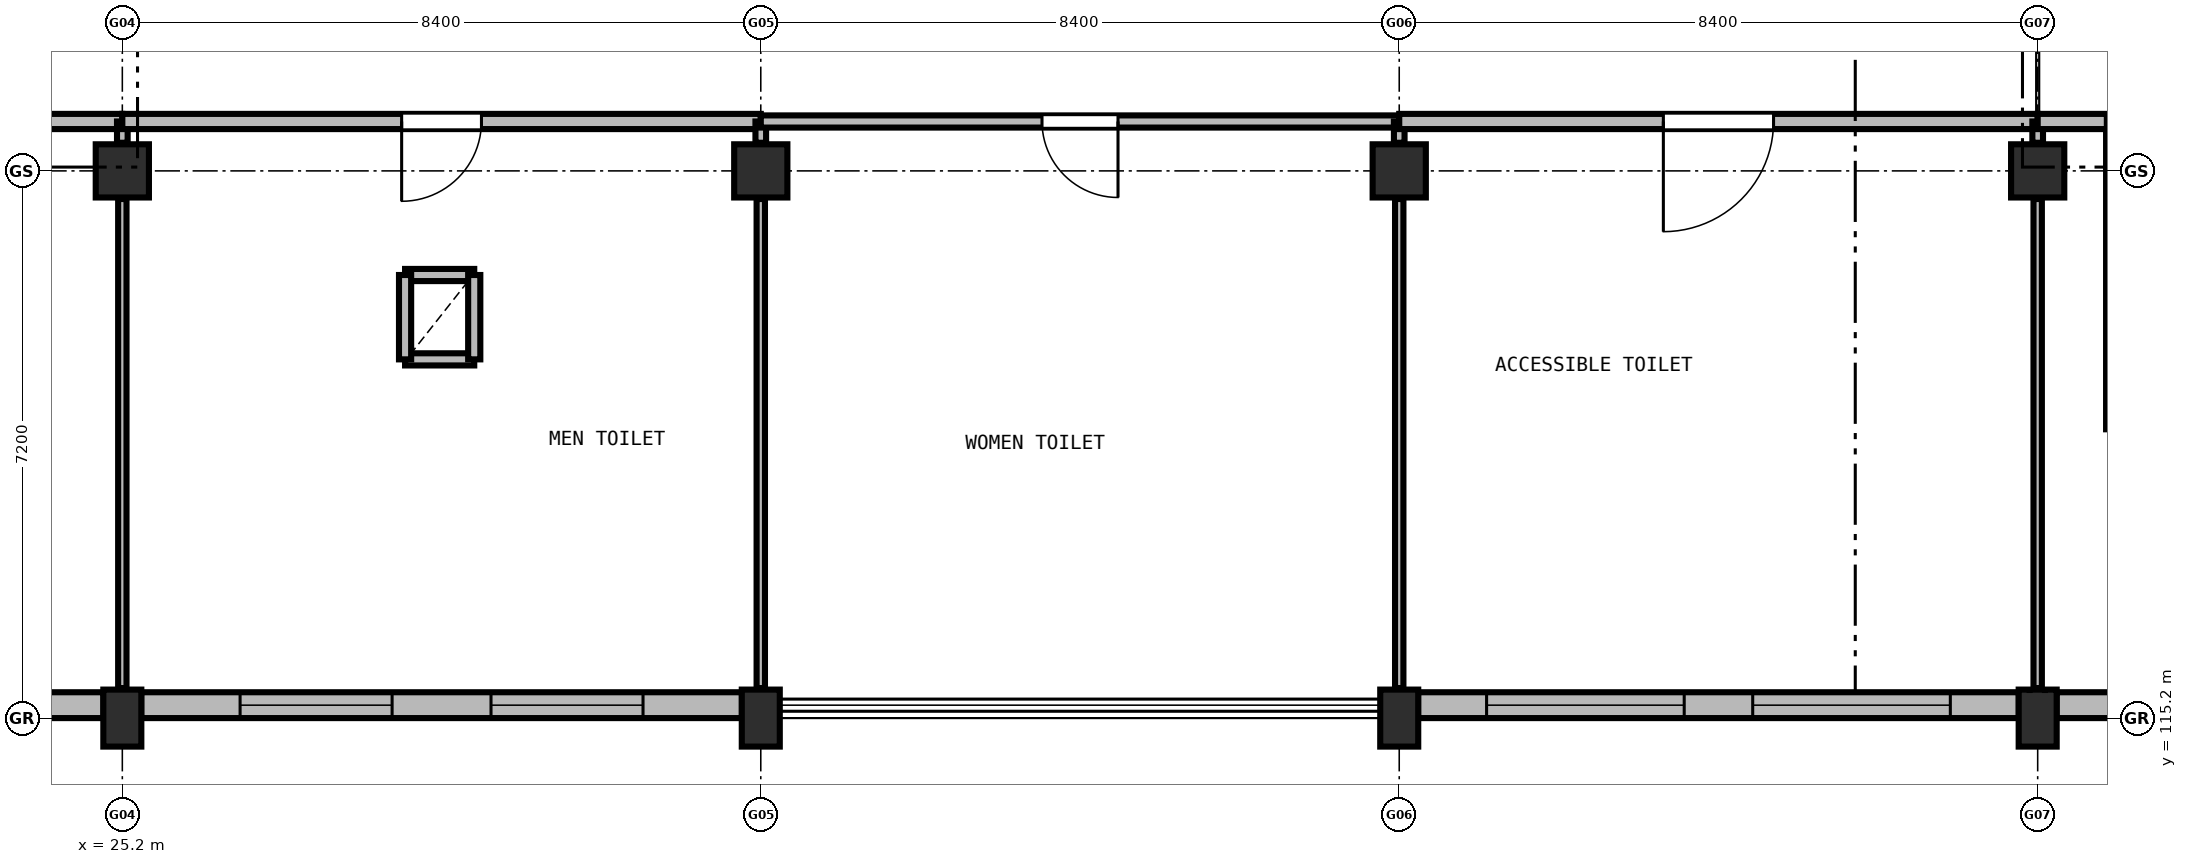
"""IFC4 building model, lengths in metres.
Left out: names, types, materials, properties, quantities, classifications, styles, units other than length and angle.
Written with IfcOpenShell. Run it as: python <this file> out.ifc"""

import sys

from ifc_helpers import new_model, si_unit, direction, frame, frame_2d, origin, origin_2d, place, context, subcontext, project, spatial, rectangle, extrude, element, fill, save


model = new_model("IFC4")
c1 = context("Model", 3, precision=1e-05, world=origin(), true_north=direction((0.0, 1.0)))
c2 = subcontext(c1, "Body", "Model", "MODEL_VIEW")
j1 = project(units=[si_unit("LENGTHUNIT", "METRE"), si_unit("PLANEANGLEUNIT", "RADIAN")], contexts=[c1])
p1 = place(None, origin())
s1 = spatial("IfcSite", under=j1, at=p1, CompositionType="ELEMENT")
p2 = place(p1, origin())
s2 = spatial("IfcBuilding", under=s1, at=p2, CompositionType="ELEMENT")
p3 = place(p2, frame((0.0, 0.0, 9.3)))
s3 = spatial("IfcBuildingStorey", under=s2, at=p3, CompositionType="ELEMENT", Elevation=9.3)
p4 = place(p3, frame((25.2, 115.2, 0.0), z_axis=(0.0, 0.0, 1.0), x_axis=(1.0, 0.0, 0.0)))
e1 = element("IfcColumn", 1, at=p4, inside=s3, PredefinedType="COLUMN", context=c2, shape_type="SweptSolid", body=[
    extrude(rectangle(XDim=0.5, YDim=0.75, at=origin_2d()), origin(), (0.0, 0.0, 1.0), 4.2),
])
p5 = place(p3, frame((25.2, 122.4, 0.0), z_axis=(0.0, 0.0, 1.0), x_axis=(1.0, 0.0, 0.0)))
e2 = element("IfcColumn", 2, at=p5, inside=s3, PredefinedType="COLUMN", context=c2, shape_type="SweptSolid", body=[
    extrude(rectangle(XDim=0.7, YDim=0.7, at=origin_2d()), origin(), (0.0, 0.0, 1.0), 4.2),
])
p6 = place(p3, frame((33.6, 115.2, 0.0), z_axis=(0.0, 0.0, 1.0), x_axis=(1.0, 0.0, 0.0)))
e3 = element("IfcColumn", 3, at=p6, inside=s3, PredefinedType="COLUMN", context=c2, shape_type="SweptSolid", body=[
    extrude(rectangle(XDim=0.5, YDim=0.75, at=origin_2d()), origin(), (0.0, 0.0, 1.0), 4.2),
])
p7 = place(p3, frame((33.6, 122.4, 0.0), z_axis=(0.0, 0.0, 1.0), x_axis=(1.0, 0.0, 0.0)))
e4 = element("IfcColumn", 4, at=p7, inside=s3, PredefinedType="COLUMN", context=c2, shape_type="SweptSolid", body=[
    extrude(rectangle(XDim=0.7, YDim=0.7, at=origin_2d()), origin(), (0.0, 0.0, 1.0), 4.2),
])
p8 = place(p3, frame((42.0, 115.2, 0.0), z_axis=(0.0, 0.0, 1.0), x_axis=(1.0, 0.0, 0.0)))
e5 = element("IfcColumn", 5, at=p8, inside=s3, PredefinedType="COLUMN", context=c2, shape_type="SweptSolid", body=[
    extrude(rectangle(XDim=0.5, YDim=0.75, at=origin_2d()), origin(), (0.0, 0.0, 1.0), 4.2),
])
p9 = place(p3, frame((42.0, 122.4, 0.0), z_axis=(0.0, 0.0, 1.0), x_axis=(1.0, 0.0, 0.0)))
e6 = element("IfcColumn", 6, at=p9, inside=s3, PredefinedType="COLUMN", context=c2, shape_type="SweptSolid", body=[
    extrude(rectangle(XDim=0.7, YDim=0.7, at=origin_2d()), origin(), (0.0, 0.0, 1.0), 4.2),
])
p10 = place(p3, frame((50.4, 115.2, 0.0), z_axis=(0.0, 0.0, 1.0), x_axis=(1.0, 0.0, 0.0)))
e7 = element("IfcColumn", 7, at=p10, inside=s3, PredefinedType="COLUMN", context=c2, shape_type="SweptSolid", body=[
    extrude(rectangle(XDim=0.5, YDim=0.75, at=origin_2d()), origin(), (0.0, 0.0, 1.0), 4.2),
])
p11 = place(p3, frame((50.4, 122.4, 0.0), z_axis=(0.0, 0.0, 1.0), x_axis=(1.0, 0.0, 0.0)))
e8 = element("IfcColumn", 8, at=p11, inside=s3, PredefinedType="COLUMN", context=c2, shape_type="SweptSolid", body=[
    extrude(rectangle(XDim=0.7, YDim=0.7, at=origin_2d()), origin(), (0.0, 0.0, 1.0), 4.2),
])
p12 = place(p3, frame((58.552, 115.37, 0.0), z_axis=(0.0, 0.0, 1.0), x_axis=(-1.0, 0.0, 0.0)))
e9 = element("IfcWall", 9, at=p12, inside=s3, PredefinedType="SOLIDWALL", context=c2, shape_type="SweptSolid", body=[
    extrude(rectangle(XDim=7.904, YDim=0.34, at=frame_2d((3.952, 0.0))), origin(), (0.0, 0.0, 1.0), 3.18),
])
p13 = place(p12, frame((2.552, 0.0, 0.95)))
e10 = element("IfcOpeningElement", 10, at=p13, cuts=e9, PredefinedType="OPENING", context=c2, shape_type="SweptSolid", body=[
    extrude(rectangle(XDim=2.8, YDim=1.98, at=frame_2d((1.4, 0.99))), frame((0.0, 0.18, 0.0), z_axis=(0.0, -1.0, 0.0), x_axis=(1.0, 0.0, 0.0)), (0.0, 0.0, 1.0), 0.36),
])
p14 = place(p3, frame((50.152, 115.37, 0.0), z_axis=(0.0, 0.0, 1.0), x_axis=(-1.0, 0.0, 0.0)))
e11 = element("IfcWall", 11, at=p14, inside=s3, PredefinedType="SOLIDWALL", context=c2, shape_type="SweptSolid", body=[
    extrude(rectangle(XDim=7.904, YDim=0.34, at=frame_2d((3.952, 0.0))), origin(), (0.0, 0.0, 1.0), 3.18),
])
p15 = place(p14, frame((0.901, 0.0, 0.95)))
e12 = element("IfcOpeningElement", 12, at=p15, cuts=e11, PredefinedType="OPENING", context=c2, shape_type="SweptSolid", body=[
    extrude(rectangle(XDim=2.6, YDim=1.8, at=frame_2d((1.3, 0.9))), frame((0.0, 0.18, 0.0), z_axis=(0.0, -1.0, 0.0), x_axis=(1.0, 0.0, 0.0)), (0.0, 0.0, 1.0), 0.36),
])
p16 = place(p14, frame((4.403, 0.0, 0.95)))
e13 = element("IfcOpeningElement", 13, at=p16, cuts=e11, PredefinedType="OPENING", context=c2, shape_type="SweptSolid", body=[
    extrude(rectangle(XDim=2.6, YDim=1.8, at=frame_2d((1.3, 0.9))), frame((0.0, 0.18, 0.0), z_axis=(0.0, -1.0, 0.0), x_axis=(1.0, 0.0, 0.0)), (0.0, 0.0, 1.0), 0.36),
])
p17 = place(p3, frame((33.352, 115.37, 0.0), z_axis=(0.0, 0.0, 1.0), x_axis=(-1.0, 0.0, 0.0)))
e14 = element("IfcWall", 14, at=p17, inside=s3, PredefinedType="SOLIDWALL", context=c2, shape_type="SweptSolid", body=[
    extrude(rectangle(XDim=7.904, YDim=0.34, at=frame_2d((3.952, 0.0))), origin(), (0.0, 0.0, 1.0), 3.18),
])
p18 = place(p17, frame((1.301, 0.0, 0.95)))
e15 = element("IfcOpeningElement", 15, at=p18, cuts=e14, PredefinedType="OPENING", context=c2, shape_type="SweptSolid", body=[
    extrude(rectangle(XDim=2.0, YDim=1.5, at=frame_2d((1.0, 0.75))), frame((0.0, 0.18, 0.0), z_axis=(0.0, -1.0, 0.0), x_axis=(1.0, 0.0, 0.0)), (0.0, 0.0, 1.0), 0.36),
])
p19 = place(p17, frame((4.603, 0.0, 0.95)))
e16 = element("IfcOpeningElement", 16, at=p19, cuts=e14, PredefinedType="OPENING", context=c2, shape_type="SweptSolid", body=[
    extrude(rectangle(XDim=2.0, YDim=1.5, at=frame_2d((1.0, 0.75))), frame((0.0, 0.18, 0.0), z_axis=(0.0, -1.0, 0.0), x_axis=(1.0, 0.0, 0.0)), (0.0, 0.0, 1.0), 0.36),
])
p20 = place(p3, frame((24.952, 115.37, 0.0), z_axis=(0.0, 0.0, 1.0), x_axis=(-1.0, 0.0, 0.0)))
e17 = element("IfcWall", 17, at=p20, inside=s3, PredefinedType="SOLIDWALL", context=c2, shape_type="SweptSolid", body=[
    extrude(rectangle(XDim=7.904, YDim=0.34, at=frame_2d((3.952, 0.0))), origin(), (0.0, 0.0, 1.0), 3.18),
])
p21 = place(p20, frame((1.635, 0.0, 0.95)))
e18 = element("IfcOpeningElement", 18, at=p21, cuts=e17, PredefinedType="OPENING", context=c2, shape_type="SweptSolid", body=[
    extrude(rectangle(XDim=1.5, YDim=1.4, at=frame_2d((0.75, 0.7))), frame((0.0, 0.18, 0.0), z_axis=(0.0, -1.0, 0.0), x_axis=(1.0, 0.0, 0.0)), (0.0, 0.0, 1.0), 0.36),
])
p22 = place(p20, frame((4.769, 0.0, 0.95)))
e19 = element("IfcOpeningElement", 19, at=p22, cuts=e17, PredefinedType="OPENING", context=c2, shape_type="SweptSolid", body=[
    extrude(rectangle(XDim=1.5, YDim=1.4, at=frame_2d((0.75, 0.7))), frame((0.0, 0.18, 0.0), z_axis=(0.0, -1.0, 0.0), x_axis=(1.0, 0.0, 0.0)), (0.0, 0.0, 1.0), 0.36),
])
p23 = place(p3, frame((51.45, 119.0, 0.0), z_axis=(0.0, 0.0, 1.0), x_axis=(0.0, 1.0, 0.0)))
e20 = element("IfcWall", 20, at=p23, inside=s3, PredefinedType="SHEAR", context=c2, shape_type="SweptSolid", body=[
    extrude(rectangle(XDim=4.1, YDim=0.3, at=frame_2d((2.05, 0.0))), origin(), (0.0, 0.0, 1.0), 3.94),
])
for number, where, z_axis, x_axis in (
    (21, (28.92, 119.92, 0.0), (0.0, 0.0, 1.0), (1.0, 0.0, 0.0)),
    (22, (29.83, 121.03, 0.0), (0.0, 0.0, 1.0), (-1.0, 0.0, 0.0)),
):
    element("IfcWall", number, at=place(p3, frame(where, z_axis=z_axis, x_axis=x_axis)), inside=s3, PredefinedType="PARTITIONING", context=c2, shape_type="SweptSolid", body=[
        extrude(rectangle(XDim=0.91, YDim=0.16, at=frame_2d((0.455, 0.0))), origin(), (0.0, 0.0, 1.0), 3.65),
    ])
for number, where, z_axis, x_axis in (
    (23, (28.92, 121.03, 0.0), (0.0, 0.0, 1.0), (0.0, -1.0, 0.0)),
    (24, (29.83, 119.92, 0.0), (0.0, 0.0, 1.0), (0.0, 1.0, 0.0)),
):
    element("IfcWall", number, at=place(p3, frame(where, z_axis=z_axis, x_axis=x_axis)), inside=s3, PredefinedType="PARTITIONING", context=c2, shape_type="SweptSolid", body=[
        extrude(rectangle(XDim=1.11, YDim=0.16, at=frame_2d((0.555, 0.0))), origin(), (0.0, 0.0, 1.0), 3.65),
    ])
p24 = place(p3, frame((25.2, 123.05, 0.0), z_axis=(0.0, 0.0, 1.0), x_axis=(-1.0, 0.0, 0.0)))
e25 = element("IfcWall", 25, at=p24, inside=s3, PredefinedType="SOLIDWALL", context=c2, shape_type="SweptSolid", body=[
    extrude(rectangle(XDim=6.11, YDim=0.2, at=frame_2d((3.055, 0.0))), origin(), (0.0, 0.0, 1.0), 3.325),
])
p25 = place(p3, frame((25.2, 115.595, 0.0), z_axis=(0.0, 0.0, 1.0), x_axis=(0.0, 1.0, 0.0)))
e26 = element("IfcWall", 26, at=p25, inside=s3, PredefinedType="PARTITIONING", context=c2, shape_type="SweptSolid", body=[
    extrude(rectangle(XDim=6.435, YDim=0.11, at=frame_2d((3.218, 0.0))), origin(), (0.0, 0.0, 1.0), 3.175),
])
p26 = place(p3, frame((25.2, 122.77, 0.0), z_axis=(0.0, 0.0, 1.0), x_axis=(0.0, 1.0, 0.0)))
e27 = element("IfcWall", 27, at=p26, inside=s3, PredefinedType="PARTITIONING", context=c2, shape_type="SweptSolid", body=[
    extrude(rectangle(XDim=0.28, YDim=0.14, at=frame_2d((0.14, 0.0))), origin(), (0.0, 0.0, 1.0), 3.175),
])
p27 = place(p3, frame((33.6, 123.05, 0.0), z_axis=(0.0, 0.0, 1.0), x_axis=(-1.0, 0.0, 0.0)))
e28 = element("IfcWall", 28, at=p27, inside=s3, PredefinedType="SOLIDWALL", context=c2, shape_type="SweptSolid", body=[
    extrude(rectangle(XDim=8.4, YDim=0.2, at=frame_2d((4.2, 0.0))), origin(), (0.0, 0.0, 1.0), 3.325),
])
p28 = place(p27, frame((3.675, 0.0, 0.0)))
e29 = element("IfcOpeningElement", 29, at=p28, cuts=e28, PredefinedType="OPENING", context=c2, shape_type="SweptSolid", body=[
    extrude(rectangle(XDim=1.05, YDim=2.15, at=frame_2d((0.525, 1.075))), frame((0.0, 0.11, 0.0), z_axis=(0.0, -1.0, 0.0), x_axis=(1.0, 0.0, 0.0)), (0.0, 0.0, 1.0), 0.22),
])
p29 = place(p3, frame((33.6, 115.595, 0.0), z_axis=(0.0, 0.0, 1.0), x_axis=(0.0, 1.0, 0.0)))
e30 = element("IfcWall", 30, at=p29, inside=s3, PredefinedType="PARTITIONING", context=c2, shape_type="SweptSolid", body=[
    extrude(rectangle(XDim=6.435, YDim=0.11, at=frame_2d((3.218, 0.0))), origin(), (0.0, 0.0, 1.0), 3.175),
])
p30 = place(p3, frame((33.6, 122.77, 0.0), z_axis=(0.0, 0.0, 1.0), x_axis=(0.0, 1.0, 0.0)))
e31 = element("IfcWall", 31, at=p30, inside=s3, PredefinedType="PARTITIONING", context=c2, shape_type="SweptSolid", body=[
    extrude(rectangle(XDim=0.28, YDim=0.14, at=frame_2d((0.14, 0.0))), origin(), (0.0, 0.0, 1.0), 3.175),
])
p31 = place(p3, frame((42.0, 123.05, 0.0), z_axis=(0.0, 0.0, 1.0), x_axis=(-1.0, 0.0, 0.0)))
e32 = element("IfcWall", 32, at=p31, inside=s3, PredefinedType="PARTITIONING", context=c2, shape_type="SweptSolid", body=[
    extrude(rectangle(XDim=8.4, YDim=0.16, at=frame_2d((4.2, 0.0))), origin(), (0.0, 0.0, 1.0), 3.325),
])
p32 = place(p31, frame((3.7, 0.0, 0.0)))
e33 = element("IfcOpeningElement", 33, at=p32, cuts=e32, PredefinedType="OPENING", context=c2, shape_type="SweptSolid", body=[
    extrude(rectangle(XDim=1.0, YDim=2.1, at=frame_2d((0.5, 1.05))), frame((0.0, 0.09, 0.0), z_axis=(0.0, -1.0, 0.0), x_axis=(1.0, 0.0, 0.0)), (0.0, 0.0, 1.0), 0.18),
])
p33 = place(p3, frame((42.0, 115.595, 0.0), z_axis=(0.0, 0.0, 1.0), x_axis=(0.0, 1.0, 0.0)))
e34 = element("IfcWall", 34, at=p33, inside=s3, PredefinedType="PARTITIONING", context=c2, shape_type="SweptSolid", body=[
    extrude(rectangle(XDim=6.435, YDim=0.11, at=frame_2d((3.218, 0.0))), origin(), (0.0, 0.0, 1.0), 3.175),
])
p34 = place(p3, frame((42.0, 122.77, 0.0), z_axis=(0.0, 0.0, 1.0), x_axis=(0.0, 1.0, 0.0)))
e35 = element("IfcWall", 35, at=p34, inside=s3, PredefinedType="PARTITIONING", context=c2, shape_type="SweptSolid", body=[
    extrude(rectangle(XDim=0.28, YDim=0.14, at=frame_2d((0.14, 0.0))), origin(), (0.0, 0.0, 1.0), 3.175),
])
p35 = place(p3, frame((50.4, 123.05, 0.0), z_axis=(0.0, 0.0, 1.0), x_axis=(-1.0, 0.0, 0.0)))
e36 = element("IfcWall", 36, at=p35, inside=s3, PredefinedType="SOLIDWALL", context=c2, shape_type="SweptSolid", body=[
    extrude(rectangle(XDim=8.4, YDim=0.2, at=frame_2d((4.2, 0.0))), origin(), (0.0, 0.0, 1.0), 3.325),
])
p36 = place(p35, frame((3.475, 0.0, 0.0)))
e37 = element("IfcOpeningElement", 37, at=p36, cuts=e36, PredefinedType="OPENING", context=c2, shape_type="SweptSolid", body=[
    extrude(rectangle(XDim=1.45, YDim=2.2, at=frame_2d((0.725, 1.1))), frame((0.0, 0.11, 0.0), z_axis=(0.0, -1.0, 0.0), x_axis=(1.0, 0.0, 0.0)), (0.0, 0.0, 1.0), 0.22),
])
p37 = place(p3, frame((50.4, 115.595, 0.0), z_axis=(0.0, 0.0, 1.0), x_axis=(0.0, 1.0, 0.0)))
e38 = element("IfcWall", 38, at=p37, inside=s3, PredefinedType="PARTITIONING", context=c2, shape_type="SweptSolid", body=[
    extrude(rectangle(XDim=6.435, YDim=0.11, at=frame_2d((3.218, 0.0))), origin(), (0.0, 0.0, 1.0), 3.175),
])
p38 = place(p3, frame((50.4, 122.77, 0.0), z_axis=(0.0, 0.0, 1.0), x_axis=(0.0, 1.0, 0.0)))
e39 = element("IfcWall", 39, at=p38, inside=s3, PredefinedType="PARTITIONING", context=c2, shape_type="SweptSolid", body=[
    extrude(rectangle(XDim=0.28, YDim=0.14, at=frame_2d((0.14, 0.0))), origin(), (0.0, 0.0, 1.0), 3.175),
])
p39 = place(p3, frame((51.31, 123.05, 0.0), z_axis=(0.0, 0.0, 1.0), x_axis=(-1.0, 0.0, 0.0)))
e40 = element("IfcWall", 40, at=p39, inside=s3, PredefinedType="SOLIDWALL", context=c2, shape_type="SweptSolid", body=[
    extrude(rectangle(XDim=0.91, YDim=0.2, at=frame_2d((0.455, 0.0))), origin(), (0.0, 0.0, 1.0), 3.325),
])
p40 = place(p15, origin())
e41 = element("IfcWindow", 41, at=p40, inside=s3, PartitioningType="SINGLE_PANEL", PredefinedType="WINDOW", context=c2, shape_type="SweptSolid", body=[
    extrude(rectangle(XDim=2.6, YDim=1.8, at=frame_2d((1.3, 0.9))), frame((0.0, 0.03, 0.0), z_axis=(0.0, -1.0, 0.0), x_axis=(1.0, 0.0, 0.0)), (0.0, 0.0, 1.0), 0.06),
])
fill(e12, e41)
p41 = place(p16, origin())
e42 = element("IfcWindow", 42, at=p41, inside=s3, PartitioningType="SINGLE_PANEL", PredefinedType="WINDOW", context=c2, shape_type="SweptSolid", body=[
    extrude(rectangle(XDim=2.6, YDim=1.8, at=frame_2d((1.3, 0.9))), frame((0.0, 0.03, 0.0), z_axis=(0.0, -1.0, 0.0), x_axis=(1.0, 0.0, 0.0)), (0.0, 0.0, 1.0), 0.06),
])
fill(e13, e42)
p42 = place(p18, origin())
e43 = element("IfcWindow", 43, at=p42, inside=s3, PartitioningType="SINGLE_PANEL", PredefinedType="WINDOW", context=c2, shape_type="SweptSolid", body=[
    extrude(rectangle(XDim=2.0, YDim=1.5, at=frame_2d((1.0, 0.75))), frame((0.0, 0.03, 0.0), z_axis=(0.0, -1.0, 0.0), x_axis=(1.0, 0.0, 0.0)), (0.0, 0.0, 1.0), 0.06),
])
fill(e15, e43)
p43 = place(p19, origin())
e44 = element("IfcWindow", 44, at=p43, inside=s3, PartitioningType="SINGLE_PANEL", PredefinedType="WINDOW", context=c2, shape_type="SweptSolid", body=[
    extrude(rectangle(XDim=2.0, YDim=1.5, at=frame_2d((1.0, 0.75))), frame((0.0, 0.03, 0.0), z_axis=(0.0, -1.0, 0.0), x_axis=(1.0, 0.0, 0.0)), (0.0, 0.0, 1.0), 0.06),
])
fill(e16, e44)
p44 = place(p28, origin())
e45 = element("IfcDoor", 45, at=p44, inside=s3, OperationType="SINGLE_SWING_RIGHT", PredefinedType="DOOR", context=c2, shape_type="SweptSolid", body=[
    extrude(rectangle(XDim=1.05, YDim=2.15, at=frame_2d((0.525, 1.075))), frame((0.0, 0.025, 0.0), z_axis=(0.0, -1.0, 0.0), x_axis=(1.0, 0.0, 0.0)), (0.0, 0.0, 1.0), 0.05),
])
fill(e29, e45)
p45 = place(p32, origin())
e46 = element("IfcDoor", 46, at=p45, inside=s3, OperationType="SINGLE_SWING_LEFT", PredefinedType="DOOR", context=c2, shape_type="SweptSolid", body=[
    extrude(rectangle(XDim=1.0, YDim=2.1, at=frame_2d((0.5, 1.05))), frame((0.0, 0.025, 0.0), z_axis=(0.0, -1.0, 0.0), x_axis=(1.0, 0.0, 0.0)), (0.0, 0.0, 1.0), 0.05),
])
fill(e33, e46)
p46 = place(p36, origin())
e47 = element("IfcDoor", 47, at=p46, inside=s3, OperationType="SINGLE_SWING_RIGHT", PredefinedType="DOOR", context=c2, shape_type="SweptSolid", body=[
    extrude(rectangle(XDim=1.45, YDim=2.2, at=frame_2d((0.725, 1.1))), frame((0.0, 0.025, 0.0), z_axis=(0.0, -1.0, 0.0), x_axis=(1.0, 0.0, 0.0)), (0.0, 0.0, 1.0), 0.05),
])
fill(e37, e47)
save(model, sys.argv[1])
